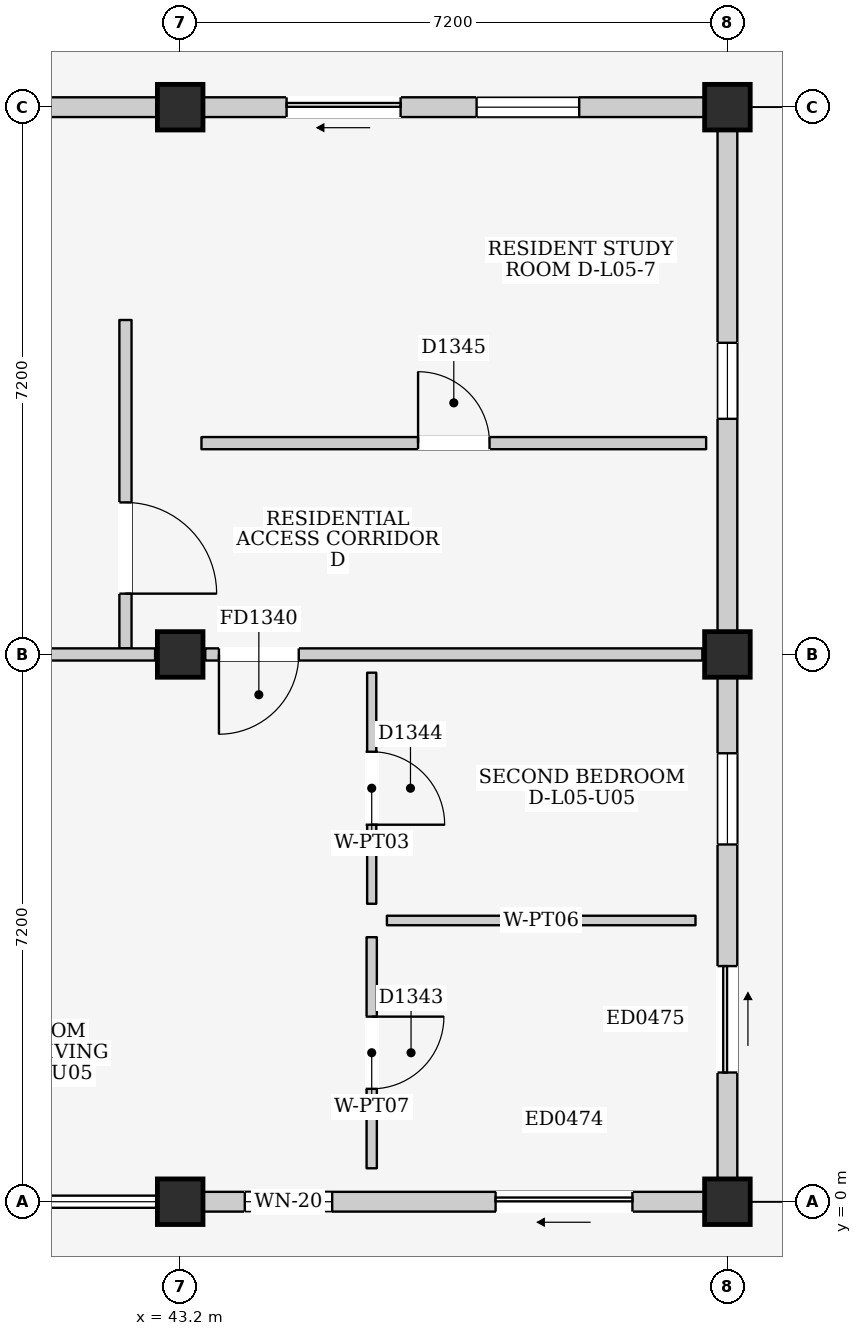
"""IFC4 building model, lengths in metres.
Left out: names, types, materials, properties, quantities, classifications, styles, units other than length and angle.
Written with IfcOpenShell. Run it as: python <this file> out.ifc"""

import sys

from ifc_helpers import new_model, si_unit, direction, frame, frame_2d, origin, origin_2d, place, context, subcontext, project, spatial, rectangle, extrude, element, fill, save


model = new_model("IFC4")
c1 = context("Model", 3, precision=1e-05, world=origin(), true_north=direction((0.0, 1.0)))
c2 = subcontext(c1, "Body", "Model", "MODEL_VIEW")
j1 = project(units=[si_unit("LENGTHUNIT", "METRE"), si_unit("PLANEANGLEUNIT", "RADIAN")], contexts=[c1])
p1 = place(None, origin())
s1 = spatial("IfcSite", under=j1, at=p1, CompositionType="ELEMENT")
p2 = place(p1, origin())
s2 = spatial("IfcBuilding", under=s1, at=p2, CompositionType="ELEMENT")
p3 = place(p2, frame((0.0, 0.0, 18.6)))
s3 = spatial("IfcBuildingStorey", under=s2, at=p3, CompositionType="ELEMENT", Elevation=18.6)
for number, where, z_axis, x_axis in (
    (1, (43.2, 0.0, 0.0), (0.0, 0.0, 1.0), (1.0, 0.0, 0.0)),
    (2, (43.2, 7.2, 0.0), (0.0, 0.0, 1.0), (1.0, 0.0, 0.0)),
    (3, (43.2, 14.4, 0.0), (0.0, 0.0, 1.0), (1.0, 0.0, 0.0)),
    (4, (50.4, 0.0, 0.0), (0.0, 0.0, 1.0), (1.0, 0.0, 0.0)),
    (5, (50.4, 7.2, 0.0), (0.0, 0.0, 1.0), (1.0, 0.0, 0.0)),
    (6, (50.4, 14.4, 0.0), (0.0, 0.0, 1.0), (1.0, 0.0, 0.0)),
):
    element("IfcColumn", number, at=place(p3, frame(where, z_axis=z_axis, x_axis=x_axis)), inside=s3, PredefinedType="COLUMN", context=c2, shape_type="SweptSolid", body=[
        extrude(rectangle(XDim=0.6, YDim=0.6, at=origin_2d()), origin(), (0.0, 0.0, 1.0), 3.3),
    ])
p4 = place(p3, frame((36.3, 14.4, 0.0), z_axis=(0.0, 0.0, 1.0), x_axis=(1.0, 0.0, 0.0)))
e7 = element("IfcWall", 7, at=p4, inside=s3, PredefinedType="ELEMENTEDWALL", context=c2, shape_type="SweptSolid", body=[
    extrude(rectangle(XDim=6.6, YDim=0.26, at=frame_2d((3.3, 0.0))), origin(), (0.0, 0.0, 1.0), 2.445),
])
p5 = place(p4, frame((2.8, 0.0, 1.2)))
e8 = element("IfcOpeningElement", 8, at=p5, cuts=e7, PredefinedType="OPENING", context=c2, shape_type="SweptSolid", body=[
    extrude(rectangle(XDim=1.0, YDim=0.9, at=frame_2d((0.5, 0.45))), frame((0.0, 0.145, 0.0), z_axis=(0.0, -1.0, 0.0), x_axis=(1.0, 0.0, 0.0)), (0.0, 0.0, 1.0), 0.29),
])
p6 = place(p3, frame((43.5, 0.0, 0.0), z_axis=(0.0, 0.0, 1.0), x_axis=(1.0, 0.0, 0.0)))
e9 = element("IfcWall", 9, at=p6, inside=s3, PredefinedType="ELEMENTEDWALL", context=c2, shape_type="SweptSolid", body=[
    extrude(rectangle(XDim=6.6, YDim=0.26, at=frame_2d((3.3, 0.0))), origin(), (0.0, 0.0, 1.0), 2.595),
])
p7 = place(p6, frame((3.85, 0.0, 0.0)))
e10 = element("IfcOpeningElement", 10, at=p7, cuts=e9, PredefinedType="OPENING", context=c2, shape_type="SweptSolid", body=[
    extrude(rectangle(XDim=1.8, YDim=2.12, at=frame_2d((0.9, 1.06))), frame((0.0, 0.145, 0.0), z_axis=(0.0, -1.0, 0.0), x_axis=(1.0, 0.0, 0.0)), (0.0, 0.0, 1.0), 0.29),
])
p8 = place(p6, frame((0.55, 0.0, 0.9)))
e11 = element("IfcOpeningElement", 11, at=p8, cuts=e9, PredefinedType="OPENING", context=c2, shape_type="SweptSolid", body=[
    extrude(rectangle(XDim=1.15, YDim=1.15, at=frame_2d((0.575, 0.575))), frame((0.0, 0.145, 0.0), z_axis=(0.0, -1.0, 0.0), x_axis=(1.0, 0.0, 0.0)), (0.0, 0.0, 1.0), 0.29),
])
p9 = place(p3, frame((50.4, 0.3, 0.0), z_axis=(0.0, 0.0, 1.0), x_axis=(0.0, 1.0, 0.0)))
e12 = element("IfcWall", 12, at=p9, inside=s3, PredefinedType="ELEMENTEDWALL", context=c2, shape_type="SweptSolid", body=[
    extrude(rectangle(XDim=6.6, YDim=0.26, at=frame_2d((3.3, 0.0))), origin(), (0.0, 0.0, 1.0), 2.545),
])
p10 = place(p9, frame((1.4, 0.0, 0.0)))
e13 = element("IfcOpeningElement", 13, at=p10, cuts=e12, PredefinedType="OPENING", context=c2, shape_type="SweptSolid", body=[
    extrude(rectangle(XDim=1.4, YDim=2.1, at=frame_2d((0.7, 1.05))), frame((0.0, 0.145, 0.0), z_axis=(0.0, -1.0, 0.0), x_axis=(1.0, 0.0, 0.0)), (0.0, 0.0, 1.0), 0.29),
])
p11 = place(p9, frame((4.4, 0.0, 0.95)))
e14 = element("IfcOpeningElement", 14, at=p11, cuts=e12, PredefinedType="OPENING", context=c2, shape_type="SweptSolid", body=[
    extrude(rectangle(XDim=1.2, YDim=1.35, at=frame_2d((0.6, 0.675))), frame((0.0, 0.145, 0.0), z_axis=(0.0, -1.0, 0.0), x_axis=(1.0, 0.0, 0.0)), (0.0, 0.0, 1.0), 0.29),
])
p12 = place(p3, frame((43.5, 14.4, 0.0), z_axis=(0.0, 0.0, 1.0), x_axis=(1.0, 0.0, 0.0)))
e15 = element("IfcWall", 15, at=p12, inside=s3, PredefinedType="ELEMENTEDWALL", context=c2, shape_type="SweptSolid", body=[
    extrude(rectangle(XDim=6.6, YDim=0.26, at=frame_2d((3.3, 0.0))), origin(), (0.0, 0.0, 1.0), 2.445),
])
p13 = place(p12, frame((1.1, 0.0, 0.0)))
e16 = element("IfcOpeningElement", 16, at=p13, cuts=e15, PredefinedType="OPENING", context=c2, shape_type="SweptSolid", body=[
    extrude(rectangle(XDim=1.5, YDim=2.12, at=frame_2d((0.75, 1.06))), frame((0.0, 0.145, 0.0), z_axis=(0.0, -1.0, 0.0), x_axis=(1.0, 0.0, 0.0)), (0.0, 0.0, 1.0), 0.29),
])
p14 = place(p12, frame((3.6, 0.0, 0.835)))
e17 = element("IfcOpeningElement", 17, at=p14, cuts=e15, PredefinedType="OPENING", context=c2, shape_type="SweptSolid", body=[
    extrude(rectangle(XDim=1.35, YDim=1.5, at=frame_2d((0.675, 0.75))), frame((0.0, 0.145, 0.0), z_axis=(0.0, -1.0, 0.0), x_axis=(1.0, 0.0, 0.0)), (0.0, 0.0, 1.0), 0.29),
])
p15 = place(p3, frame((50.4, 7.5, 0.0), z_axis=(0.0, 0.0, 1.0), x_axis=(0.0, 1.0, 0.0)))
e18 = element("IfcWall", 18, at=p15, inside=s3, PredefinedType="ELEMENTEDWALL", context=c2, shape_type="SweptSolid", body=[
    extrude(rectangle(XDim=6.6, YDim=0.26, at=frame_2d((3.3, 0.0))), origin(), (0.0, 0.0, 1.0), 2.545),
])
p16 = place(p15, frame((2.8, 0.0, 1.1)))
e19 = element("IfcOpeningElement", 19, at=p16, cuts=e18, PredefinedType="OPENING", context=c2, shape_type="SweptSolid", body=[
    extrude(rectangle(XDim=1.0, YDim=0.9, at=frame_2d((0.5, 0.45))), frame((0.0, 0.145, 0.0), z_axis=(0.0, -1.0, 0.0), x_axis=(1.0, 0.0, 0.0)), (0.0, 0.0, 1.0), 0.29),
])
p17 = place(p3, frame((42.48, 7.28, 0.0), z_axis=(0.0, 0.0, 1.0), x_axis=(0.0, 1.0, 0.0)))
e20 = element("IfcWall", 20, at=p17, inside=s3, PredefinedType="PARTITIONING", context=c2, shape_type="SweptSolid", body=[
    extrude(rectangle(XDim=4.32, YDim=0.16, at=frame_2d((2.16, 0.0))), origin(), (0.0, 0.0, 1.0), 3.06),
])
p18 = place(p17, frame((0.72, 0.0, 0.0)))
e21 = element("IfcOpeningElement", 21, at=p18, cuts=e20, PredefinedType="OPENING", context=c2, shape_type="SweptSolid", body=[
    extrude(rectangle(XDim=1.2, YDim=2.2, at=frame_2d((0.6, 1.1))), frame((0.0, 0.095, 0.0), z_axis=(0.0, -1.0, 0.0), x_axis=(1.0, 0.0, 0.0)), (0.0, 0.0, 1.0), 0.19),
])
p19 = place(p3, frame((36.33, 7.2, 0.0), z_axis=(0.0, 0.0, 1.0), x_axis=(1.0, 0.0, 0.0)))
e22 = element("IfcWall", 22, at=p19, inside=s3, PredefinedType="PARTITIONING", context=c2, shape_type="SweptSolid", body=[
    extrude(rectangle(XDim=6.54, YDim=0.16, at=frame_2d((3.27, 0.0))), origin(), (0.0, 0.0, 1.0), 2.445),
])
p20 = place(p3, frame((43.53, 7.2, 0.0), z_axis=(0.0, 0.0, 1.0), x_axis=(1.0, 0.0, 0.0)))
e23 = element("IfcWall", 23, at=p20, inside=s3, PredefinedType="PARTITIONING", context=c2, shape_type="SweptSolid", body=[
    extrude(rectangle(XDim=6.54, YDim=0.16, at=frame_2d((3.27, 0.0))), origin(), (0.0, 0.0, 1.0), 2.445),
])
p21 = place(p20, frame((0.18, 0.0, 0.0)))
e24 = element("IfcOpeningElement", 24, at=p21, cuts=e23, PredefinedType="OPENING", context=c2, shape_type="SweptSolid", body=[
    extrude(rectangle(XDim=1.05, YDim=2.15, at=frame_2d((0.525, 1.075))), frame((0.0, 0.095, 0.0), z_axis=(0.0, -1.0, 0.0), x_axis=(1.0, 0.0, 0.0)), (0.0, 0.0, 1.0), 0.19),
])
p22 = place(p3, frame((45.72, 0.44, 0.0), z_axis=(0.0, 0.0, 1.0), x_axis=(0.0, 1.0, 0.0)))
e25 = element("IfcWall", 25, at=p22, inside=s3, PredefinedType="PARTITIONING", context=c2, shape_type="SweptSolid", body=[
    extrude(rectangle(XDim=3.04, YDim=0.135, at=frame_2d((1.52, 0.0))), origin(), (0.0, 0.0, 1.0), 3.06),
])
p23 = place(p22, frame((1.045, 0.0, 0.0)))
e26 = element("IfcOpeningElement", 26, at=p23, cuts=e25, PredefinedType="OPENING", context=c2, shape_type="SweptSolid", body=[
    extrude(rectangle(XDim=0.95, YDim=2.15, at=frame_2d((0.475, 1.075))), frame((0.0, 0.083, 0.0), z_axis=(0.0, -1.0, 0.0), x_axis=(1.0, 0.0, 0.0)), (0.0, 0.0, 1.0), 0.165),
])
p24 = place(p3, frame((45.92, 3.7, 0.0), z_axis=(0.0, 0.0, 1.0), x_axis=(1.0, 0.0, 0.0)))
e27 = element("IfcWall", 27, at=p24, inside=s3, PredefinedType="PARTITIONING", context=c2, shape_type="SweptSolid", body=[
    extrude(rectangle(XDim=4.06, YDim=0.125, at=frame_2d((2.03, 0.0))), origin(), (0.0, 0.0, 1.0), 3.06),
])
p25 = place(p3, frame((45.72, 3.92, 0.0), z_axis=(0.0, 0.0, 1.0), x_axis=(0.0, 1.0, 0.0)))
e28 = element("IfcWall", 28, at=p25, inside=s3, PredefinedType="PARTITIONING", context=c2, shape_type="SweptSolid", body=[
    extrude(rectangle(XDim=3.04, YDim=0.12, at=frame_2d((1.52, 0.0))), origin(), (0.0, 0.0, 1.0), 3.06),
])
p26 = place(p25, frame((1.04, 0.0, 0.0)))
e29 = element("IfcOpeningElement", 29, at=p26, cuts=e28, PredefinedType="OPENING", context=c2, shape_type="SweptSolid", body=[
    extrude(rectangle(XDim=0.96, YDim=2.15, at=frame_2d((0.48, 1.075))), frame((0.0, 0.075, 0.0), z_axis=(0.0, -1.0, 0.0), x_axis=(1.0, 0.0, 0.0)), (0.0, 0.0, 1.0), 0.15),
])
p27 = place(p3, frame((43.48, 9.98, 0.0), z_axis=(0.0, 0.0, 1.0), x_axis=(1.0, 0.0, 0.0)))
e30 = element("IfcWall", 30, at=p27, inside=s3, PredefinedType="PARTITIONING", context=c2, shape_type="SweptSolid", body=[
    extrude(rectangle(XDim=6.64, YDim=0.16, at=frame_2d((3.32, 0.0))), origin(), (0.0, 0.0, 1.0), 3.06),
])
p28 = place(p27, frame((2.85, 0.0, 0.0)))
e31 = element("IfcOpeningElement", 31, at=p28, cuts=e30, PredefinedType="OPENING", context=c2, shape_type="SweptSolid", body=[
    extrude(rectangle(XDim=0.94, YDim=2.12, at=frame_2d((0.47, 1.06))), frame((0.0, 0.095, 0.0), z_axis=(0.0, -1.0, 0.0), x_axis=(1.0, 0.0, 0.0)), (0.0, 0.0, 1.0), 0.19),
])
p29 = place(p7, frame((1.8, 0.0, 0.0), z_axis=(0.0, 0.0, 1.0), x_axis=(-1.0, 0.0, 0.0)))
e32 = element("IfcDoor", 32, at=p29, inside=s3, OperationType="SLIDING_TO_LEFT", PredefinedType="DOOR", context=c2, shape_type="SweptSolid", body=[
    extrude(rectangle(XDim=1.8, YDim=2.12, at=frame_2d((0.9, 1.06))), frame((0.0, 0.025, 0.0), z_axis=(0.0, -1.0, 0.0), x_axis=(1.0, 0.0, 0.0)), (0.0, 0.0, 1.0), 0.05),
])
fill(e10, e32)
p30 = place(p8, origin())
e33 = element("IfcWindow", 33, at=p30, inside=s3, PartitioningType="SINGLE_PANEL", PredefinedType="WINDOW", context=c2, shape_type="SweptSolid", body=[
    extrude(rectangle(XDim=1.15, YDim=1.15, at=frame_2d((0.575, 0.575))), frame((0.0, 0.03, 0.0), z_axis=(0.0, -1.0, 0.0), x_axis=(1.0, 0.0, 0.0)), (0.0, 0.0, 1.0), 0.06),
])
fill(e11, e33)
p31 = place(p10, frame((1.4, 0.0, 0.0), z_axis=(0.0, 0.0, 1.0), x_axis=(-1.0, 0.0, 0.0)))
e34 = element("IfcDoor", 34, at=p31, inside=s3, OperationType="SLIDING_TO_RIGHT", PredefinedType="DOOR", context=c2, shape_type="SweptSolid", body=[
    extrude(rectangle(XDim=1.4, YDim=2.1, at=frame_2d((0.7, 1.05))), frame((0.0, 0.025, 0.0), z_axis=(0.0, -1.0, 0.0), x_axis=(1.0, 0.0, 0.0)), (0.0, 0.0, 1.0), 0.05),
])
fill(e13, e34)
p32 = place(p11, origin())
e35 = element("IfcWindow", 35, at=p32, inside=s3, PartitioningType="SINGLE_PANEL", PredefinedType="WINDOW", context=c2, shape_type="SweptSolid", body=[
    extrude(rectangle(XDim=1.2, YDim=1.35, at=frame_2d((0.6, 0.675))), frame((0.0, 0.03, 0.0), z_axis=(0.0, -1.0, 0.0), x_axis=(1.0, 0.0, 0.0)), (0.0, 0.0, 1.0), 0.06),
])
fill(e14, e35)
p33 = place(p13, frame((1.5, 0.0, 0.0), z_axis=(0.0, 0.0, 1.0), x_axis=(-1.0, 0.0, 0.0)))
e36 = element("IfcDoor", 36, at=p33, inside=s3, OperationType="SLIDING_TO_LEFT", PredefinedType="DOOR", context=c2, shape_type="SweptSolid", body=[
    extrude(rectangle(XDim=1.5, YDim=2.12, at=frame_2d((0.75, 1.06))), frame((0.0, 0.025, 0.0), z_axis=(0.0, -1.0, 0.0), x_axis=(1.0, 0.0, 0.0)), (0.0, 0.0, 1.0), 0.05),
])
fill(e16, e36)
p34 = place(p14, origin())
e37 = element("IfcWindow", 37, at=p34, inside=s3, PartitioningType="SINGLE_PANEL", PredefinedType="WINDOW", context=c2, shape_type="SweptSolid", body=[
    extrude(rectangle(XDim=1.35, YDim=1.5, at=frame_2d((0.675, 0.75))), frame((0.0, 0.03, 0.0), z_axis=(0.0, -1.0, 0.0), x_axis=(1.0, 0.0, 0.0)), (0.0, 0.0, 1.0), 0.06),
])
fill(e17, e37)
p35 = place(p16, origin())
e38 = element("IfcWindow", 38, at=p35, inside=s3, PartitioningType="SINGLE_PANEL", PredefinedType="WINDOW", context=c2, shape_type="SweptSolid", body=[
    extrude(rectangle(XDim=1.0, YDim=0.9, at=frame_2d((0.5, 0.45))), frame((0.0, 0.03, 0.0), z_axis=(0.0, -1.0, 0.0), x_axis=(1.0, 0.0, 0.0)), (0.0, 0.0, 1.0), 0.06),
])
fill(e19, e38)
p36 = place(p18, frame((1.2, 0.0, 0.0), z_axis=(0.0, 0.0, 1.0), x_axis=(-1.0, 0.0, 0.0)))
e39 = element("IfcDoor", 39, at=p36, inside=s3, OperationType="SINGLE_SWING_RIGHT", PredefinedType="DOOR", context=c2, shape_type="SweptSolid", body=[
    extrude(rectangle(XDim=1.2, YDim=2.2, at=frame_2d((0.6, 1.1))), frame((0.0, 0.025, 0.0), z_axis=(0.0, -1.0, 0.0), x_axis=(1.0, 0.0, 0.0)), (0.0, 0.0, 1.0), 0.05),
])
fill(e21, e39)
p37 = place(p21, frame((1.05, 0.0, 0.0), z_axis=(0.0, 0.0, 1.0), x_axis=(-1.0, 0.0, 0.0)))
e40 = element("IfcDoor", 40, at=p37, inside=s3, OperationType="SINGLE_SWING_RIGHT", PredefinedType="DOOR", context=c2, shape_type="SweptSolid", body=[
    extrude(rectangle(XDim=1.05, YDim=2.15, at=frame_2d((0.525, 1.075))), frame((0.0, 0.025, 0.0), z_axis=(0.0, -1.0, 0.0), x_axis=(1.0, 0.0, 0.0)), (0.0, 0.0, 1.0), 0.05),
])
fill(e24, e40)
p38 = place(p23, frame((0.95, 0.0, 0.0), z_axis=(0.0, 0.0, 1.0), x_axis=(-1.0, 0.0, 0.0)))
e41 = element("IfcDoor", 41, at=p38, inside=s3, OperationType="SINGLE_SWING_LEFT", PredefinedType="DOOR", context=c2, shape_type="SweptSolid", body=[
    extrude(rectangle(XDim=0.95, YDim=2.15, at=frame_2d((0.475, 1.075))), frame((0.0, 0.025, 0.0), z_axis=(0.0, -1.0, 0.0), x_axis=(1.0, 0.0, 0.0)), (0.0, 0.0, 1.0), 0.05),
])
fill(e26, e41)
p39 = place(p26, frame((0.96, 0.0, 0.0), z_axis=(0.0, 0.0, 1.0), x_axis=(-1.0, 0.0, 0.0)))
e42 = element("IfcDoor", 42, at=p39, inside=s3, OperationType="SINGLE_SWING_RIGHT", PredefinedType="DOOR", context=c2, shape_type="SweptSolid", body=[
    extrude(rectangle(XDim=0.96, YDim=2.15, at=frame_2d((0.48, 1.075))), frame((0.0, 0.025, 0.0), z_axis=(0.0, -1.0, 0.0), x_axis=(1.0, 0.0, 0.0)), (0.0, 0.0, 1.0), 0.05),
])
fill(e29, e42)
p40 = place(p28, origin())
e43 = element("IfcDoor", 43, at=p40, inside=s3, OperationType="SINGLE_SWING_LEFT", PredefinedType="DOOR", context=c2, shape_type="SweptSolid", body=[
    extrude(rectangle(XDim=0.94, YDim=2.12, at=frame_2d((0.47, 1.06))), frame((0.0, 0.025, 0.0), z_axis=(0.0, -1.0, 0.0), x_axis=(1.0, 0.0, 0.0)), (0.0, 0.0, 1.0), 0.05),
])
fill(e31, e43)
save(model, sys.argv[1])
